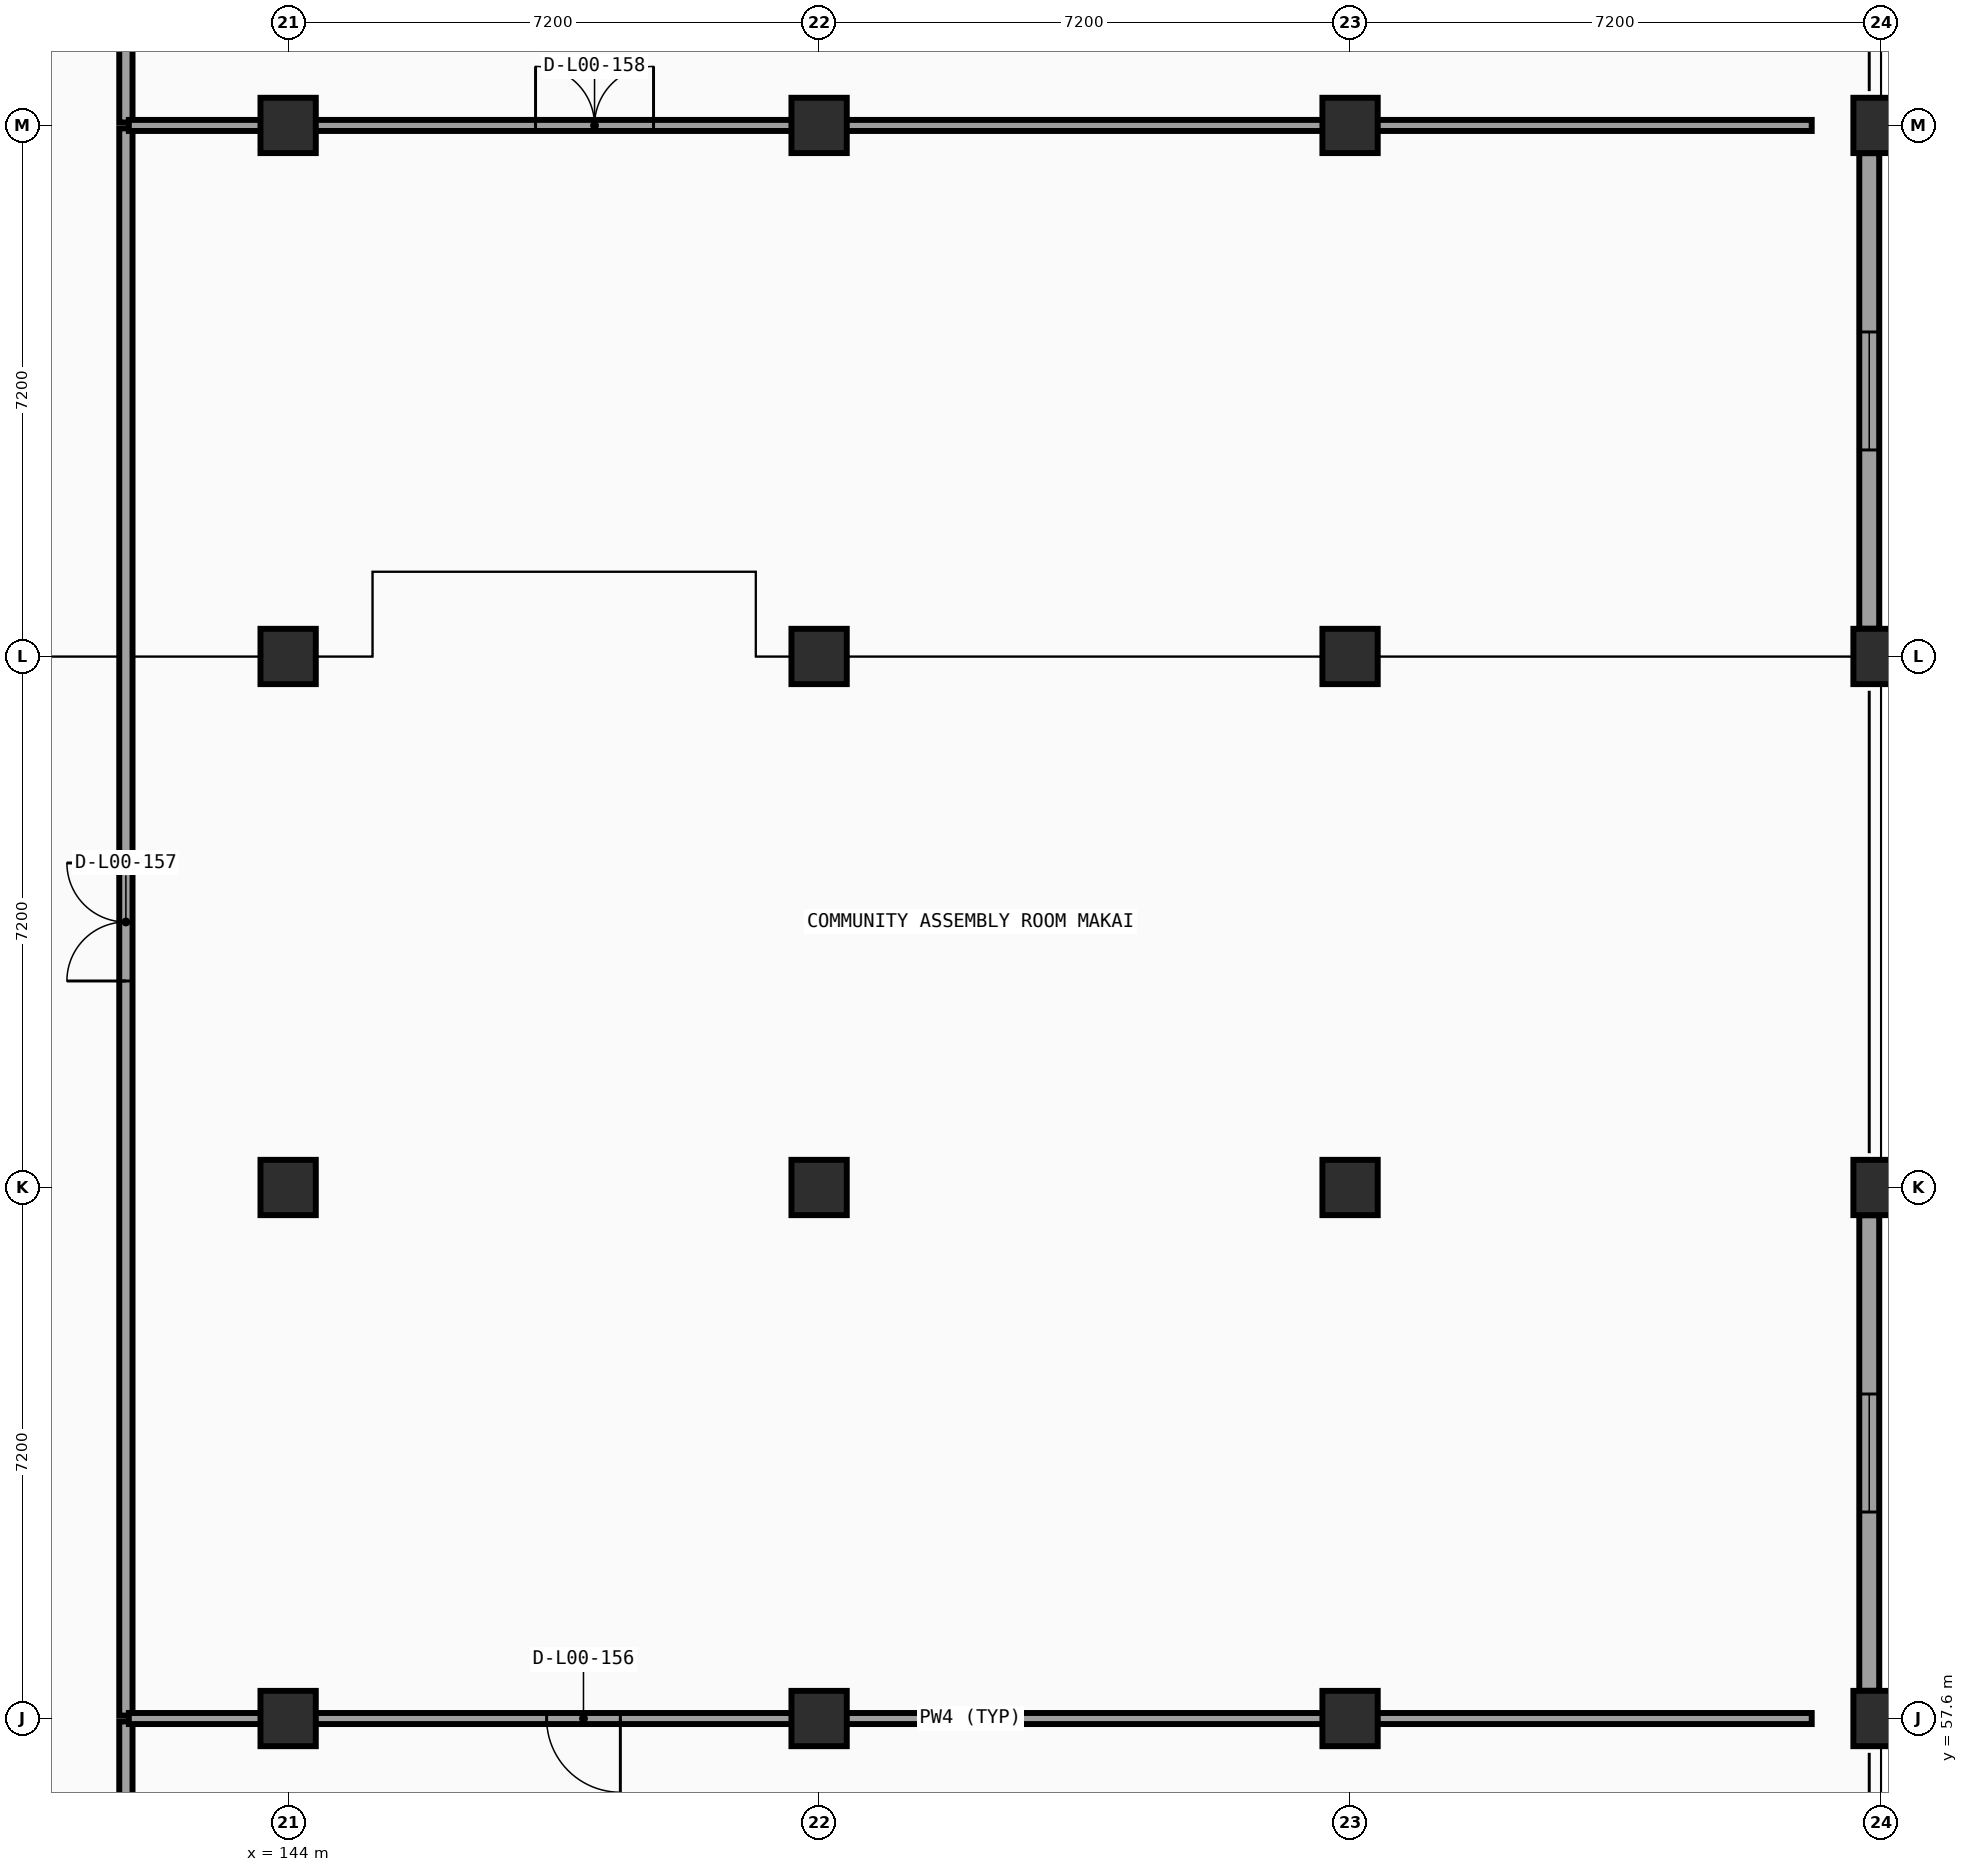
"""IFC4 building model, lengths in metres.
Left out: names, types, materials, properties, quantities, classifications, styles, units other than length and angle.
Written with IfcOpenShell. Run it as: python <this file> out.ifc"""

import sys

from ifc_helpers import new_model, si_unit, direction, frame, frame_2d, origin, origin_2d, place, context, subcontext, project, spatial, rectangle, extrude, element, fill, save


model = new_model("IFC4")
c1 = context("Model", 3, precision=1e-05, world=origin(), true_north=direction((0.0, 1.0)))
c2 = subcontext(c1, "Body", "Model", "MODEL_VIEW")
j1 = project(units=[si_unit("LENGTHUNIT", "METRE"), si_unit("PLANEANGLEUNIT", "RADIAN")], contexts=[c1])
p1 = place(None, origin())
s1 = spatial("IfcSite", under=j1, at=p1, CompositionType="ELEMENT")
p2 = place(p1, origin())
s2 = spatial("IfcBuilding", under=s1, at=p2, CompositionType="ELEMENT")
p3 = place(p2, origin())
s3 = spatial("IfcBuildingStorey", under=s2, at=p3, CompositionType="ELEMENT", Elevation=0.0)
for number, where, z_axis, x_axis in (
    (1, (144.0, 57.6, 0.0), (0.0, 0.0, 1.0), (1.0, 0.0, 0.0)),
    (2, (144.0, 64.8, 0.0), (0.0, 0.0, 1.0), (1.0, 0.0, 0.0)),
    (3, (144.0, 72.0, 0.0), (0.0, 0.0, 1.0), (1.0, 0.0, 0.0)),
    (4, (144.0, 79.2, 0.0), (0.0, 0.0, 1.0), (1.0, 0.0, 0.0)),
    (5, (151.2, 57.6, 0.0), (0.0, 0.0, 1.0), (1.0, 0.0, 0.0)),
    (6, (151.2, 64.8, 0.0), (0.0, 0.0, 1.0), (1.0, 0.0, 0.0)),
    (7, (151.2, 72.0, 0.0), (0.0, 0.0, 1.0), (1.0, 0.0, 0.0)),
    (8, (151.2, 79.2, 0.0), (0.0, 0.0, 1.0), (1.0, 0.0, 0.0)),
    (9, (158.4, 57.6, 0.0), (0.0, 0.0, 1.0), (1.0, 0.0, 0.0)),
    (10, (158.4, 64.8, 0.0), (0.0, 0.0, 1.0), (1.0, 0.0, 0.0)),
    (11, (158.4, 72.0, 0.0), (0.0, 0.0, 1.0), (1.0, 0.0, 0.0)),
    (12, (158.4, 79.2, 0.0), (0.0, 0.0, 1.0), (1.0, 0.0, 0.0)),
    (13, (165.6, 57.6, 0.0), (0.0, 0.0, 1.0), (1.0, 0.0, 0.0)),
    (14, (165.6, 64.8, 0.0), (0.0, 0.0, 1.0), (1.0, 0.0, 0.0)),
    (15, (165.6, 72.0, 0.0), (0.0, 0.0, 1.0), (1.0, 0.0, 0.0)),
    (16, (165.6, 79.2, 0.0), (0.0, 0.0, 1.0), (1.0, 0.0, 0.0)),
):
    element("IfcColumn", number, at=place(p3, frame(where, z_axis=z_axis, x_axis=x_axis)), inside=s3, PredefinedType="COLUMN", context=c2, shape_type="SweptSolid", body=[
        extrude(rectangle(XDim=0.75, YDim=0.75, at=origin_2d()), origin(), (0.0, 0.0, 1.0), 5.4),
    ])
p4 = place(p3, frame((165.44, 78.824, 0.0), z_axis=(0.0, 0.0, 1.0), x_axis=(0.0, -1.0, 0.0)))
e17 = element("IfcWall", 17, at=p4, inside=s3, PredefinedType="SOLIDWALL", context=c2, shape_type="SweptSolid", body=[
    extrude(rectangle(XDim=6.448, YDim=0.27, at=frame_2d((3.224, 0.0))), origin(), (0.0, 0.0, 1.0), 4.461),
])
p5 = place(p4, frame((2.424, 0.0, 0.8)))
e18 = element("IfcOpeningElement", 18, at=p5, cuts=e17, PredefinedType="OPENING", context=c2, shape_type="SweptSolid", body=[
    extrude(rectangle(XDim=1.6, YDim=1.95, at=frame_2d((0.8, 0.975))), frame((0.0, 0.145, 0.0), z_axis=(0.0, -1.0, 0.0), x_axis=(1.0, 0.0, 0.0)), (0.0, 0.0, 1.0), 0.29),
])
p6 = place(p3, frame((165.44, 64.424, 0.0), z_axis=(0.0, 0.0, 1.0), x_axis=(0.0, -1.0, 0.0)))
e19 = element("IfcWall", 19, at=p6, inside=s3, PredefinedType="SOLIDWALL", context=c2, shape_type="SweptSolid", body=[
    extrude(rectangle(XDim=6.448, YDim=0.27, at=frame_2d((3.224, 0.0))), origin(), (0.0, 0.0, 1.0), 4.461),
])
p7 = place(p6, frame((2.424, 0.0, 0.8)))
e20 = element("IfcOpeningElement", 20, at=p7, cuts=e19, PredefinedType="OPENING", context=c2, shape_type="SweptSolid", body=[
    extrude(rectangle(XDim=1.6, YDim=1.95, at=frame_2d((0.8, 0.975))), frame((0.0, 0.145, 0.0), z_axis=(0.0, -1.0, 0.0), x_axis=(1.0, 0.0, 0.0)), (0.0, 0.0, 1.0), 0.29),
])
p8 = place(p3, frame((141.8, 43.44, 0.0), z_axis=(0.0, 0.0, 1.0), x_axis=(0.0, 1.0, 0.0)))
e21 = element("IfcWall", 21, at=p8, inside=s3, PredefinedType="PARTITIONING", context=c2, shape_type="SweptSolid", body=[
    extrude(rectangle(XDim=14.12, YDim=0.18, at=frame_2d((7.06, 0.0))), origin(), (0.0, 0.0, 1.0), 4.45),
])
p9 = place(p8, frame((9.63, 0.0, 0.0)))
e22 = element("IfcOpeningElement", 22, at=p9, cuts=e21, PredefinedType="OPENING", context=c2, shape_type="SweptSolid", body=[
    extrude(rectangle(XDim=1.0, YDim=2.1, at=frame_2d((0.5, 1.05))), frame((0.0, 0.1, 0.0), z_axis=(0.0, -1.0, 0.0), x_axis=(1.0, 0.0, 0.0)), (0.0, 0.0, 1.0), 0.2),
])
p10 = place(p3, frame((141.8, 57.64, 0.0), z_axis=(0.0, 0.0, 1.0), x_axis=(0.0, 1.0, 0.0)))
e23 = element("IfcWall", 23, at=p10, inside=s3, PredefinedType="PARTITIONING", context=c2, shape_type="SweptSolid", body=[
    extrude(rectangle(XDim=21.52, YDim=0.18, at=frame_2d((10.76, 0.0))), origin(), (0.0, 0.0, 1.0), 4.45),
])
p11 = place(p10, frame((9.96, 0.0, 0.0)))
e24 = element("IfcOpeningElement", 24, at=p11, cuts=e23, PredefinedType="OPENING", context=c2, shape_type="SweptSolid", body=[
    extrude(rectangle(XDim=1.6, YDim=2.1, at=frame_2d((0.8, 1.05))), frame((0.0, 0.1, 0.0), z_axis=(0.0, -1.0, 0.0), x_axis=(1.0, 0.0, 0.0)), (0.0, 0.0, 1.0), 0.2),
])
p12 = place(p3, frame((141.8, 79.24, 0.0), z_axis=(0.0, 0.0, 1.0), x_axis=(0.0, 1.0, 0.0)))
e25 = element("IfcWall", 25, at=p12, inside=s3, PredefinedType="PARTITIONING", context=c2, shape_type="SweptSolid", body=[
    extrude(rectangle(XDim=7.32, YDim=0.18, at=frame_2d((3.66, 0.0))), origin(), (0.0, 0.0, 1.0), 4.45),
])
p13 = place(p12, frame((3.16, 0.0, 0.0)))
e26 = element("IfcOpeningElement", 26, at=p13, cuts=e25, PredefinedType="OPENING", context=c2, shape_type="SweptSolid", body=[
    extrude(rectangle(XDim=1.0, YDim=2.1, at=frame_2d((0.5, 1.05))), frame((0.0, 0.1, 0.0), z_axis=(0.0, -1.0, 0.0), x_axis=(1.0, 0.0, 0.0)), (0.0, 0.0, 1.0), 0.2),
])
p14 = place(p3, frame((141.84, 57.6, 0.0), z_axis=(0.0, 0.0, 1.0), x_axis=(1.0, 0.0, 0.0)))
e27 = element("IfcWall", 27, at=p14, inside=s3, PredefinedType="PARTITIONING", context=c2, shape_type="SweptSolid", body=[
    extrude(rectangle(XDim=22.82, YDim=0.15, at=frame_2d((11.41, 0.0))), origin(), (0.0, 0.0, 1.0), 4.311),
])
p15 = place(p14, frame((5.665, 0.0, 0.0)))
e28 = element("IfcOpeningElement", 28, at=p15, cuts=e27, PredefinedType="OPENING", context=c2, shape_type="SweptSolid", body=[
    extrude(rectangle(XDim=1.0, YDim=2.1, at=frame_2d((0.5, 1.05))), frame((0.0, 0.085, 0.0), z_axis=(0.0, -1.0, 0.0), x_axis=(1.0, 0.0, 0.0)), (0.0, 0.0, 1.0), 0.17),
])
p16 = place(p3, frame((141.84, 79.2, 0.0), z_axis=(0.0, 0.0, 1.0), x_axis=(1.0, 0.0, 0.0)))
e29 = element("IfcWall", 29, at=p16, inside=s3, PredefinedType="PARTITIONING", context=c2, shape_type="SweptSolid", body=[
    extrude(rectangle(XDim=22.82, YDim=0.15, at=frame_2d((11.41, 0.0))), origin(), (0.0, 0.0, 1.0), 4.311),
])
p17 = place(p16, frame((5.515, 0.0, 0.0)))
e30 = element("IfcOpeningElement", 30, at=p17, cuts=e29, PredefinedType="OPENING", context=c2, shape_type="SweptSolid", body=[
    extrude(rectangle(XDim=1.6, YDim=2.1, at=frame_2d((0.8, 1.05))), frame((0.0, 0.085, 0.0), z_axis=(0.0, -1.0, 0.0), x_axis=(1.0, 0.0, 0.0)), (0.0, 0.0, 1.0), 0.17),
])
p18 = place(p5, origin())
e31 = element("IfcWindow", 31, at=p18, inside=s3, PartitioningType="SINGLE_PANEL", PredefinedType="WINDOW", context=c2, shape_type="SweptSolid", body=[
    extrude(rectangle(XDim=1.6, YDim=1.95, at=frame_2d((0.8, 0.975))), frame((0.0, 0.03, 0.0), z_axis=(0.0, -1.0, 0.0), x_axis=(1.0, 0.0, 0.0)), (0.0, 0.0, 1.0), 0.06),
])
fill(e18, e31)
p19 = place(p7, origin())
e32 = element("IfcWindow", 32, at=p19, inside=s3, PartitioningType="SINGLE_PANEL", PredefinedType="WINDOW", context=c2, shape_type="SweptSolid", body=[
    extrude(rectangle(XDim=1.6, YDim=1.95, at=frame_2d((0.8, 0.975))), frame((0.0, 0.03, 0.0), z_axis=(0.0, -1.0, 0.0), x_axis=(1.0, 0.0, 0.0)), (0.0, 0.0, 1.0), 0.06),
])
fill(e20, e32)
p20 = place(p15, origin())
e33 = element("IfcDoor", 33, at=p20, inside=s3, OperationType="SINGLE_SWING_RIGHT", PredefinedType="DOOR", context=c2, shape_type="SweptSolid", body=[
    extrude(rectangle(XDim=1.0, YDim=2.1, at=frame_2d((0.5, 1.05))), frame((0.0, 0.025, 0.0), z_axis=(0.0, -1.0, 0.0), x_axis=(1.0, 0.0, 0.0)), (0.0, 0.0, 1.0), 0.05),
])
fill(e28, e33)
p21 = place(p11, origin())
e34 = element("IfcDoor", 34, at=p21, inside=s3, OperationType="DOUBLE_DOOR_SINGLE_SWING", PredefinedType="DOOR", context=c2, shape_type="SweptSolid", body=[
    extrude(rectangle(XDim=1.6, YDim=2.1, at=frame_2d((0.8, 1.05))), frame((0.0, 0.025, 0.0), z_axis=(0.0, -1.0, 0.0), x_axis=(1.0, 0.0, 0.0)), (0.0, 0.0, 1.0), 0.05),
])
fill(e24, e34)
p22 = place(p17, origin())
e35 = element("IfcDoor", 35, at=p22, inside=s3, OperationType="DOUBLE_DOOR_SINGLE_SWING", PredefinedType="DOOR", context=c2, shape_type="SweptSolid", body=[
    extrude(rectangle(XDim=1.6, YDim=2.1, at=frame_2d((0.8, 1.05))), frame((0.0, 0.025, 0.0), z_axis=(0.0, -1.0, 0.0), x_axis=(1.0, 0.0, 0.0)), (0.0, 0.0, 1.0), 0.05),
])
fill(e30, e35)
save(model, sys.argv[1])
